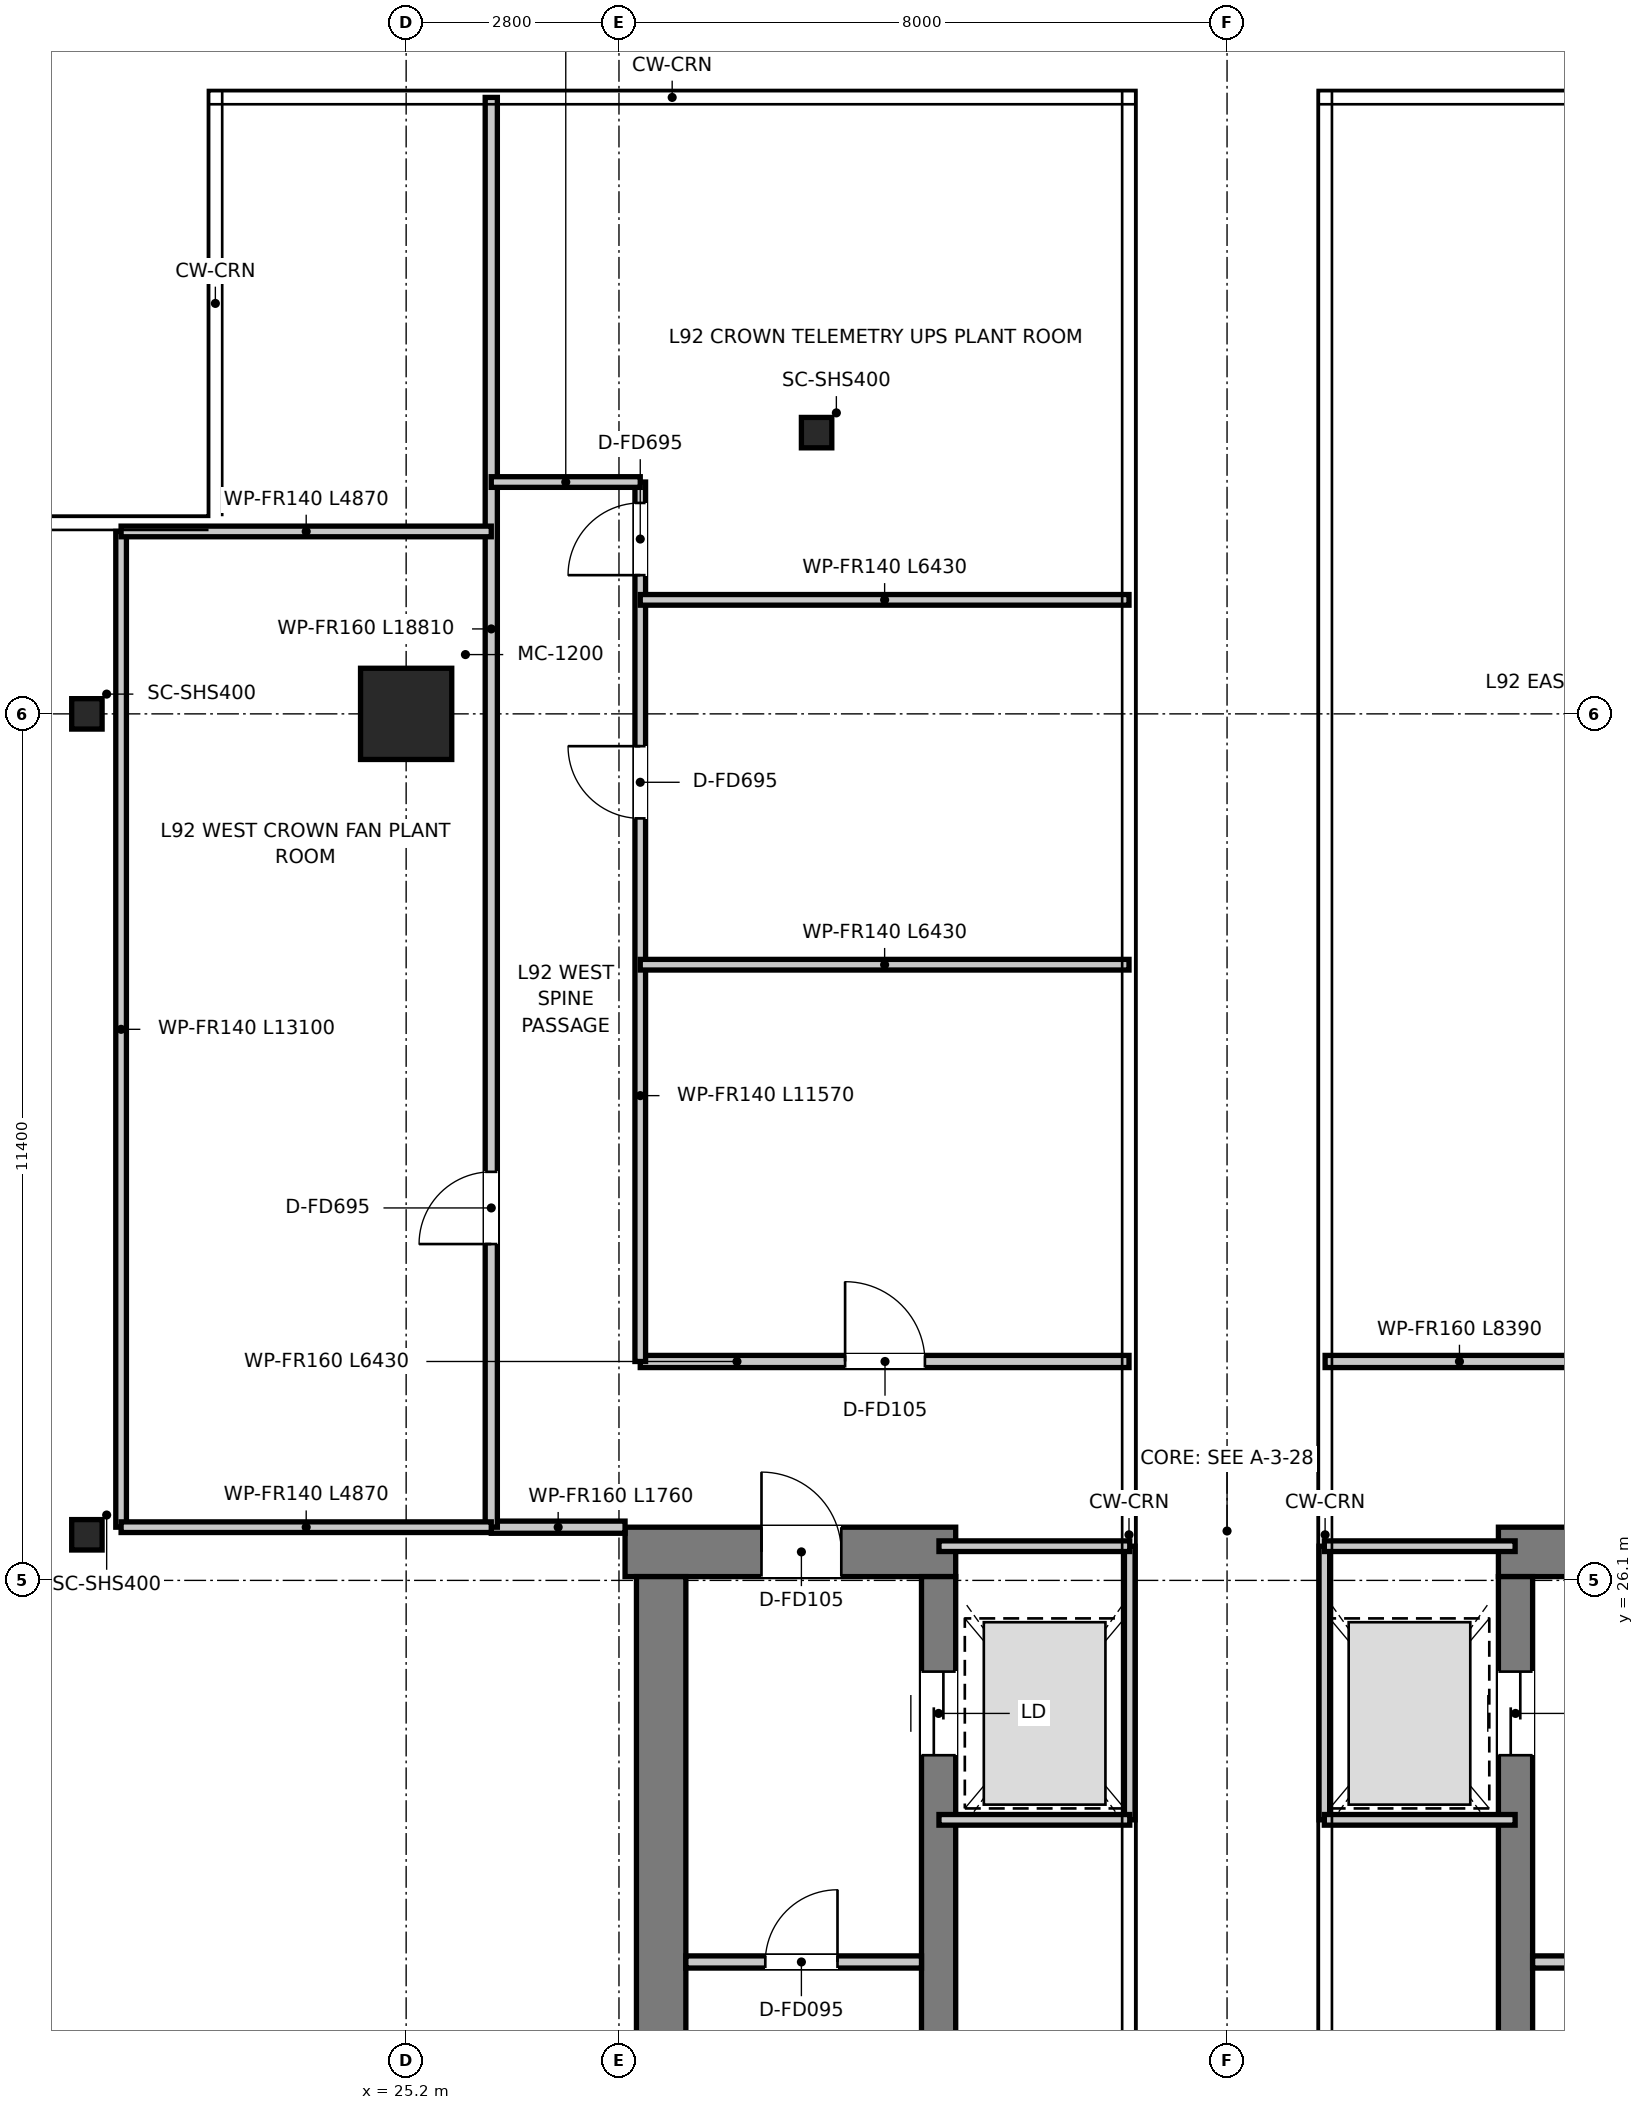
"""IFC4 building model, lengths in metres.
Left out: names, types, materials, properties, quantities, classifications, styles, units other than length and angle.
Written with IfcOpenShell. Run it as: python <this file> out.ifc"""

import sys

from ifc_helpers import new_model, si_unit, direction, frame, frame_2d, origin, origin_2d, place, context, subcontext, project, spatial, rectangle, hollow_rectangle, extrude, source, transform, mapped, element, fill, save


model = new_model("IFC4")
c1 = context("Model", 3, precision=1e-05, world=origin(), true_north=direction((0.0, 1.0)))
c2 = subcontext(c1, "Body", "Model", "MODEL_VIEW")
j1 = project(units=[si_unit("LENGTHUNIT", "METRE"), si_unit("PLANEANGLEUNIT", "RADIAN")], contexts=[c1])
p1 = place(None, origin())
s1 = spatial("IfcSite", under=j1, at=p1, CompositionType="ELEMENT")
p2 = place(p1, origin())
s2 = spatial("IfcBuilding", under=s1, at=p2, CompositionType="ELEMENT")
p3 = place(p2, frame((0.0, 0.0, 374.65)))
s3 = spatial("IfcBuildingStorey", under=s2, at=p3, CompositionType="ELEMENT", Elevation=374.65)
p4 = place(p3, frame((28.08, 26.475, 0.0), z_axis=(0.0, 0.0, 1.0), x_axis=(1.0, 0.0, 0.0)))
e1 = element("IfcWall", 1, at=p4, inside=s3, PredefinedType="SHEAR", context=c2, shape_type="SweptSolid", body=[
    extrude(rectangle(XDim=4.35, YDim=0.65, at=frame_2d((2.175, 0.0))), origin(), (0.0, 0.0, 1.0), 3.6),
])
p5 = place(p4, frame((1.795, 0.0, 0.0)))
e2 = element("IfcOpeningElement", 2, at=p5, cuts=e1, PredefinedType="OPENING", context=c2, shape_type="SweptSolid", body=[
    extrude(rectangle(XDim=1.05, YDim=2.1, at=frame_2d((0.525, 1.05))), frame((0.0, 0.335, 0.0), z_axis=(0.0, -1.0, 0.0), x_axis=(1.0, 0.0, 0.0)), (0.0, 0.0, 1.0), 0.67),
])
p6 = place(p3, frame((28.555, 11.15, 0.0), z_axis=(0.0, 0.0, 1.0), x_axis=(0.0, 1.0, 0.0)))
e3 = element("IfcWall", 3, at=p6, inside=s3, PredefinedType="SHEAR", context=c2, shape_type="SweptSolid", body=[
    extrude(rectangle(XDim=15.0, YDim=0.65, at=frame_2d((7.5, 0.0))), origin(), (0.0, 0.0, 1.0), 3.6),
])
p7 = place(p3, frame((32.205, 13.22, 0.0), z_axis=(0.0, 0.0, 1.0), x_axis=(0.0, 1.0, 0.0)))
e4 = element("IfcWall", 4, at=p7, inside=s3, PredefinedType="SHEAR", context=c2, shape_type="SweptSolid", body=[
    extrude(rectangle(XDim=12.93, YDim=0.45, at=frame_2d((6.465, 0.0))), origin(), (0.0, 0.0, 1.0), 3.6),
])
p8 = place(p7, frame((10.58, 0.0, 0.0)))
e5 = element("IfcOpeningElement", 5, at=p8, cuts=e4, PredefinedType="OPENING", context=c2, shape_type="SweptSolid", body=[
    extrude(rectangle(XDim=1.1, YDim=2.15, at=frame_2d((0.55, 1.075))), frame((0.0, 0.235, 0.0), z_axis=(0.0, -1.0, 0.0), x_axis=(1.0, 0.0, 0.0)), (0.0, 0.0, 1.0), 0.47),
])
p9 = place(p3, frame((39.57, 26.475, 0.0), z_axis=(0.0, 0.0, 1.0), x_axis=(1.0, 0.0, 0.0)))
e6 = element("IfcWall", 6, at=p9, inside=s3, PredefinedType="SHEAR", context=c2, shape_type="SweptSolid", body=[
    extrude(rectangle(XDim=4.35, YDim=0.65, at=frame_2d((2.175, 0.0))), origin(), (0.0, 0.0, 1.0), 3.6),
])
p10 = place(p9, frame((1.505, 0.0, 0.0)))
e7 = element("IfcOpeningElement", 7, at=p10, cuts=e6, PredefinedType="OPENING", context=c2, shape_type="SweptSolid", body=[
    extrude(rectangle(XDim=1.05, YDim=2.1, at=frame_2d((0.525, 1.05))), frame((0.0, 0.335, 0.0), z_axis=(0.0, -1.0, 0.0), x_axis=(1.0, 0.0, 0.0)), (0.0, 0.0, 1.0), 0.67),
])
p11 = place(p3, frame((39.795, 13.22, 0.0), z_axis=(0.0, 0.0, 1.0), x_axis=(0.0, 1.0, 0.0)))
e8 = element("IfcWall", 8, at=p11, inside=s3, PredefinedType="SHEAR", context=c2, shape_type="SweptSolid", body=[
    extrude(rectangle(XDim=12.93, YDim=0.45, at=frame_2d((6.465, 0.0))), origin(), (0.0, 0.0, 1.0), 3.6),
])
p12 = place(p11, frame((10.58, 0.0, 0.0)))
e9 = element("IfcOpeningElement", 9, at=p12, cuts=e8, PredefinedType="OPENING", context=c2, shape_type="SweptSolid", body=[
    extrude(rectangle(XDim=1.1, YDim=2.15, at=frame_2d((0.55, 1.075))), frame((0.0, 0.235, 0.0), z_axis=(0.0, -1.0, 0.0), x_axis=(1.0, 0.0, 0.0)), (0.0, 0.0, 1.0), 0.47),
])
m1 = source(origin(), c2, "Body", "SweptSolid", [
    extrude(rectangle(XDim=1.2, YDim=1.2, at=origin_2d()), origin(), (0.0, 0.0, 1.0), 3.6),
])
p13 = place(p3, frame((25.2, 37.5, 0.0), z_axis=(0.0, 0.0, 1.0), x_axis=(1.0, 0.0, 0.0)))
e10 = element("IfcColumn", 10, at=p13, inside=s3, PredefinedType="USERDEFINED", context=c2, shape_type="MappedRepresentation", body=[
    mapped(m1, transform((0.0, 0.0, 0.0), x_axis=(1.0, 0.0, 0.0), y_axis=(0.0, 1.0, 0.0), z_axis=(0.0, 0.0, 1.0), scale=1.0)),
])
m2 = source(origin(), c2, "Body", "SweptSolid", [
    extrude(hollow_rectangle(XDim=0.4, YDim=0.4, WallThickness=0.025, at=origin_2d()), origin(), (0.0, 0.0, 1.0), 3.6),
])
for number, where, z_axis, x_axis in (
    (11, (21.0, 26.7, 0.0), (0.0, 0.0, 1.0), (1.0, 0.0, 0.0)),
    (12, (21.0, 37.5, 0.0), (0.0, 0.0, 1.0), (1.0, 0.0, 0.0)),
    (13, (30.6, 41.2, 0.0), (0.0, 0.0, 1.0), (1.0, 0.0, 0.0)),
):
    element("IfcColumn", number, at=place(p3, frame(where, z_axis=z_axis, x_axis=x_axis)), inside=s3, PredefinedType="COLUMN", context=c2, shape_type="MappedRepresentation", body=[
        mapped(m2, transform((0.0, 0.0, 0.0), x_axis=(1.0, 0.0, 0.0), y_axis=(0.0, 1.0, 0.0), z_axis=(0.0, 0.0, 1.0), scale=1.0)),
    ])
p14 = place(p3, frame((28.88, 21.08, 0.0), z_axis=(0.0, 0.0, 1.0), x_axis=(1.0, 0.0, 0.0)))
e14 = element("IfcWall", 14, at=p14, inside=s3, PredefinedType="PARTITIONING", context=c2, shape_type="SweptSolid", body=[
    extrude(rectangle(XDim=3.1, YDim=0.16, at=frame_2d((1.55, 0.0))), origin(), (0.0, 0.0, 1.0), 3.3),
])
p15 = place(p14, frame((1.045, 0.0, 0.0)))
e15 = element("IfcOpeningElement", 15, at=p15, cuts=e14, PredefinedType="OPENING", context=c2, shape_type="SweptSolid", body=[
    extrude(rectangle(XDim=0.95, YDim=2.1, at=frame_2d((0.475, 1.05))), frame((0.0, 0.09, 0.0), z_axis=(0.0, -1.0, 0.0), x_axis=(1.0, 0.0, 0.0)), (0.0, 0.0, 1.0), 0.18),
])
p16 = place(p3, frame((34.72, 22.95, 0.0), z_axis=(0.0, 0.0, 1.0), x_axis=(0.0, 1.0, 0.0)))
e16 = element("IfcWall", 16, at=p16, inside=s3, PredefinedType="PARTITIONING", context=c2, shape_type="SweptSolid", body=[
    extrude(rectangle(XDim=3.6, YDim=0.14, at=frame_2d((1.8, 0.0))), origin(), (0.0, 0.0, 1.0), 3.3),
])
for number, where, z_axis, x_axis in (
    (17, (32.21, 22.95, 0.0), (0.0, 0.0, 1.0), (1.0, 0.0, 0.0)),
    (18, (32.21, 26.55, 0.0), (0.0, 0.0, 1.0), (1.0, 0.0, 0.0)),
):
    element("IfcWall", number, at=place(p3, frame(where, z_axis=z_axis, x_axis=x_axis)), inside=s3, PredefinedType="PARTITIONING", context=c2, shape_type="SweptSolid", body=[
        extrude(rectangle(XDim=2.51, YDim=0.14, at=frame_2d((1.255, 0.0))), origin(), (0.0, 0.0, 1.0), 3.3),
    ])
p17 = place(p3, frame((40.02, 21.08, 0.0), z_axis=(0.0, 0.0, 1.0), x_axis=(1.0, 0.0, 0.0)))
e19 = element("IfcWall", 19, at=p17, inside=s3, PredefinedType="PARTITIONING", context=c2, shape_type="SweptSolid", body=[
    extrude(rectangle(XDim=3.1, YDim=0.16, at=frame_2d((1.55, 0.0))), origin(), (0.0, 0.0, 1.0), 3.3),
])
p18 = place(p17, frame((1.105, 0.0, 0.0)))
e20 = element("IfcOpeningElement", 20, at=p18, cuts=e19, PredefinedType="OPENING", context=c2, shape_type="SweptSolid", body=[
    extrude(rectangle(XDim=0.95, YDim=2.1, at=frame_2d((0.475, 1.05))), frame((0.0, 0.09, 0.0), z_axis=(0.0, -1.0, 0.0), x_axis=(1.0, 0.0, 0.0)), (0.0, 0.0, 1.0), 0.18),
])
p19 = place(p3, frame((37.28, 22.95, 0.0), z_axis=(0.0, 0.0, 1.0), x_axis=(0.0, 1.0, 0.0)))
e21 = element("IfcWall", 21, at=p19, inside=s3, PredefinedType="PARTITIONING", context=c2, shape_type="SweptSolid", body=[
    extrude(rectangle(XDim=3.6, YDim=0.14, at=frame_2d((1.8, 0.0))), origin(), (0.0, 0.0, 1.0), 3.3),
])
for number, where, z_axis, x_axis in (
    (22, (37.28, 22.95, 0.0), (0.0, 0.0, 1.0), (1.0, 0.0, 0.0)),
    (23, (37.28, 26.55, 0.0), (0.0, 0.0, 1.0), (1.0, 0.0, 0.0)),
):
    element("IfcWall", number, at=place(p3, frame(where, z_axis=z_axis, x_axis=x_axis)), inside=s3, PredefinedType="PARTITIONING", context=c2, shape_type="SweptSolid", body=[
        extrude(rectangle(XDim=2.51, YDim=0.14, at=frame_2d((1.255, 0.0))), origin(), (0.0, 0.0, 1.0), 3.3),
    ])
p20 = place(p3, frame((28.28, 28.98, 0.0), z_axis=(0.0, 0.0, 1.0), x_axis=(1.0, 0.0, 0.0)))
e24 = element("IfcWall", 24, at=p20, inside=s3, PredefinedType="PARTITIONING", context=c2, shape_type="SweptSolid", body=[
    extrude(rectangle(XDim=6.43, YDim=0.16, at=frame_2d((3.215, 0.0))), origin(), (0.0, 0.0, 1.0), 2.81),
])
p21 = place(p20, frame((2.695, 0.0, 0.0)))
e25 = element("IfcOpeningElement", 25, at=p21, cuts=e24, PredefinedType="OPENING", context=c2, shape_type="SweptSolid", body=[
    extrude(rectangle(XDim=1.05, YDim=2.1, at=frame_2d((0.525, 1.05))), frame((0.0, 0.09, 0.0), z_axis=(0.0, -1.0, 0.0), x_axis=(1.0, 0.0, 0.0)), (0.0, 0.0, 1.0), 0.18),
])
p22 = place(p3, frame((26.32, 26.8, 0.0), z_axis=(0.0, 0.0, 1.0), x_axis=(1.0, 0.0, 0.0)))
e26 = element("IfcWall", 26, at=p22, inside=s3, PredefinedType="PARTITIONING", context=c2, shape_type="SweptSolid", body=[
    extrude(rectangle(XDim=1.76, YDim=0.16, at=frame_2d((0.88, 0.0))), origin(), (0.0, 0.0, 1.0), 3.3),
])
p23 = place(p3, frame((26.32, 26.8, 0.0), z_axis=(0.0, 0.0, 1.0), x_axis=(0.0, 1.0, 0.0)))
e27 = element("IfcWall", 27, at=p23, inside=s3, PredefinedType="PARTITIONING", context=c2, shape_type="SweptSolid", body=[
    extrude(rectangle(XDim=18.81, YDim=0.16, at=frame_2d((9.405, 0.0))), origin(), (0.0, 0.0, 1.0), 2.81),
])
p24 = place(p23, frame((3.725, 0.0, 0.0)))
e28 = element("IfcOpeningElement", 28, at=p24, cuts=e27, PredefinedType="OPENING", context=c2, shape_type="SweptSolid", body=[
    extrude(rectangle(XDim=0.95, YDim=2.1, at=frame_2d((0.475, 1.05))), frame((0.0, 0.09, 0.0), z_axis=(0.0, -1.0, 0.0), x_axis=(1.0, 0.0, 0.0)), (0.0, 0.0, 1.0), 0.18),
])
p25 = place(p3, frame((21.45, 26.8, 0.0), z_axis=(0.0, 0.0, 1.0), x_axis=(0.0, 1.0, 0.0)))
e29 = element("IfcWall", 29, at=p25, inside=s3, PredefinedType="PARTITIONING", context=c2, shape_type="SweptSolid", body=[
    extrude(rectangle(XDim=13.1, YDim=0.14, at=frame_2d((6.55, 0.0))), origin(), (0.0, 0.0, 1.0), 2.81),
])
p26 = place(p3, frame((21.45, 26.8, 0.0), z_axis=(0.0, 0.0, 1.0), x_axis=(1.0, 0.0, 0.0)))
e30 = element("IfcWall", 30, at=p26, inside=s3, PredefinedType="PARTITIONING", context=c2, shape_type="SweptSolid", body=[
    extrude(rectangle(XDim=4.87, YDim=0.14, at=frame_2d((2.435, 0.0))), origin(), (0.0, 0.0, 1.0), 2.81),
])
p27 = place(p3, frame((21.45, 39.9, 0.0), z_axis=(0.0, 0.0, 1.0), x_axis=(1.0, 0.0, 0.0)))
e31 = element("IfcWall", 31, at=p27, inside=s3, PredefinedType="PARTITIONING", context=c2, shape_type="SweptSolid", body=[
    extrude(rectangle(XDim=4.87, YDim=0.14, at=frame_2d((2.435, 0.0))), origin(), (0.0, 0.0, 1.0), 3.3),
])
p28 = place(p3, frame((28.28, 28.98, 0.0), z_axis=(0.0, 0.0, 1.0), x_axis=(0.0, 1.0, 0.0)))
e32 = element("IfcWall", 32, at=p28, inside=s3, PredefinedType="PARTITIONING", context=c2, shape_type="SweptSolid", body=[
    extrude(rectangle(XDim=11.57, YDim=0.14, at=frame_2d((5.785, 0.0))), origin(), (0.0, 0.0, 1.0), 2.81),
])
p29 = place(p28, frame((7.145, 0.0, 0.0)))
e33 = element("IfcOpeningElement", 33, at=p29, cuts=e32, PredefinedType="OPENING", context=c2, shape_type="SweptSolid", body=[
    extrude(rectangle(XDim=0.95, YDim=2.1, at=frame_2d((0.475, 1.05))), frame((0.0, 0.08, 0.0), z_axis=(0.0, -1.0, 0.0), x_axis=(1.0, 0.0, 0.0)), (0.0, 0.0, 1.0), 0.16),
])
p30 = place(p28, frame((10.345, 0.0, 0.0)))
e34 = element("IfcOpeningElement", 34, at=p30, cuts=e32, PredefinedType="OPENING", context=c2, shape_type="SweptSolid", body=[
    extrude(rectangle(XDim=0.95, YDim=2.1, at=frame_2d((0.475, 1.05))), frame((0.0, 0.08, 0.0), z_axis=(0.0, -1.0, 0.0), x_axis=(1.0, 0.0, 0.0)), (0.0, 0.0, 1.0), 0.16),
])
for number, where, z_axis, x_axis in (
    (35, (28.28, 34.2, 0.0), (0.0, 0.0, 1.0), (1.0, 0.0, 0.0)),
    (36, (28.28, 39.0, 0.0), (0.0, 0.0, 1.0), (1.0, 0.0, 0.0)),
):
    element("IfcWall", number, at=place(p3, frame(where, z_axis=z_axis, x_axis=x_axis)), inside=s3, PredefinedType="PARTITIONING", context=c2, shape_type="SweptSolid", body=[
        extrude(rectangle(XDim=6.43, YDim=0.14, at=frame_2d((3.215, 0.0))), origin(), (0.0, 0.0, 1.0), 2.81),
    ])
p31 = place(p3, frame((26.32, 40.55, 0.0), z_axis=(0.0, 0.0, 1.0), x_axis=(1.0, 0.0, 0.0)))
e37 = element("IfcWall", 37, at=p31, inside=s3, PredefinedType="PARTITIONING", context=c2, shape_type="SweptSolid", body=[
    extrude(rectangle(XDim=1.96, YDim=0.14, at=frame_2d((0.98, 0.0))), origin(), (0.0, 0.0, 1.0), 3.3),
])
p32 = place(p3, frame((37.29, 28.98, 0.0), z_axis=(0.0, 0.0, 1.0), x_axis=(1.0, 0.0, 0.0)))
e38 = element("IfcWall", 38, at=p32, inside=s3, PredefinedType="PARTITIONING", context=c2, shape_type="SweptSolid", body=[
    extrude(rectangle(XDim=8.39, YDim=0.16, at=frame_2d((4.195, 0.0))), origin(), (0.0, 0.0, 1.0), 2.81),
])
p33 = place(p32, frame((3.685, 0.0, 0.0)))
e39 = element("IfcOpeningElement", 39, at=p33, cuts=e38, PredefinedType="OPENING", context=c2, shape_type="SweptSolid", body=[
    extrude(rectangle(XDim=1.05, YDim=2.1, at=frame_2d((0.525, 1.05))), frame((0.0, 0.09, 0.0), z_axis=(0.0, -1.0, 0.0), x_axis=(1.0, 0.0, 0.0)), (0.0, 0.0, 1.0), 0.18),
])
p34 = place(p15, origin())
e40 = element("IfcDoor", 40, at=p34, inside=s3, OperationType="SINGLE_SWING_RIGHT", PredefinedType="DOOR", context=c2, shape_type="SweptSolid", body=[
    extrude(rectangle(XDim=0.95, YDim=2.1, at=frame_2d((0.475, 1.05))), frame((0.0, 0.025, 0.0), z_axis=(0.0, -1.0, 0.0), x_axis=(1.0, 0.0, 0.0)), (0.0, 0.0, 1.0), 0.05),
])
fill(e15, e40)
p35 = place(p8, origin())
e41 = element("IfcDoor", 41, at=p35, inside=s3, OperationType="DOUBLE_DOOR_SLIDING", PredefinedType="DOOR", context=c2, shape_type="SweptSolid", body=[
    extrude(rectangle(XDim=1.1, YDim=2.15, at=frame_2d((0.55, 1.075))), frame((0.0, 0.025, 0.0), z_axis=(0.0, -1.0, 0.0), x_axis=(1.0, 0.0, 0.0)), (0.0, 0.0, 1.0), 0.05),
])
fill(e5, e41)
p36 = place(p5, origin())
e42 = element("IfcDoor", 42, at=p36, inside=s3, OperationType="SINGLE_SWING_LEFT", PredefinedType="DOOR", context=c2, shape_type="SweptSolid", body=[
    extrude(rectangle(XDim=1.05, YDim=2.1, at=frame_2d((0.525, 1.05))), frame((0.0, 0.025, 0.0), z_axis=(0.0, -1.0, 0.0), x_axis=(1.0, 0.0, 0.0)), (0.0, 0.0, 1.0), 0.05),
])
fill(e2, e42)
p37 = place(p12, origin())
e43 = element("IfcDoor", 43, at=p37, inside=s3, OperationType="DOUBLE_DOOR_SLIDING", PredefinedType="DOOR", context=c2, shape_type="SweptSolid", body=[
    extrude(rectangle(XDim=1.1, YDim=2.15, at=frame_2d((0.55, 1.075))), frame((0.0, 0.025, 0.0), z_axis=(0.0, -1.0, 0.0), x_axis=(1.0, 0.0, 0.0)), (0.0, 0.0, 1.0), 0.05),
])
fill(e9, e43)
p38 = place(p21, origin())
e44 = element("IfcDoor", 44, at=p38, inside=s3, OperationType="SINGLE_SWING_LEFT", PredefinedType="DOOR", context=c2, shape_type="SweptSolid", body=[
    extrude(rectangle(XDim=1.05, YDim=2.1, at=frame_2d((0.525, 1.05))), frame((0.0, 0.025, 0.0), z_axis=(0.0, -1.0, 0.0), x_axis=(1.0, 0.0, 0.0)), (0.0, 0.0, 1.0), 0.05),
])
fill(e25, e44)
p39 = place(p29, origin())
e45 = element("IfcDoor", 45, at=p39, inside=s3, OperationType="SINGLE_SWING_RIGHT", PredefinedType="DOOR", context=c2, shape_type="SweptSolid", body=[
    extrude(rectangle(XDim=0.95, YDim=2.1, at=frame_2d((0.475, 1.05))), frame((0.0, 0.025, 0.0), z_axis=(0.0, -1.0, 0.0), x_axis=(1.0, 0.0, 0.0)), (0.0, 0.0, 1.0), 0.05),
])
fill(e33, e45)
p40 = place(p30, origin())
e46 = element("IfcDoor", 46, at=p40, inside=s3, OperationType="SINGLE_SWING_LEFT", PredefinedType="DOOR", context=c2, shape_type="SweptSolid", body=[
    extrude(rectangle(XDim=0.95, YDim=2.1, at=frame_2d((0.475, 1.05))), frame((0.0, 0.025, 0.0), z_axis=(0.0, -1.0, 0.0), x_axis=(1.0, 0.0, 0.0)), (0.0, 0.0, 1.0), 0.05),
])
fill(e34, e46)
p41 = place(p24, origin())
e47 = element("IfcDoor", 47, at=p41, inside=s3, OperationType="SINGLE_SWING_LEFT", PredefinedType="DOOR", context=c2, shape_type="SweptSolid", body=[
    extrude(rectangle(XDim=0.95, YDim=2.1, at=frame_2d((0.475, 1.05))), frame((0.0, 0.025, 0.0), z_axis=(0.0, -1.0, 0.0), x_axis=(1.0, 0.0, 0.0)), (0.0, 0.0, 1.0), 0.05),
])
fill(e28, e47)
save(model, sys.argv[1])
